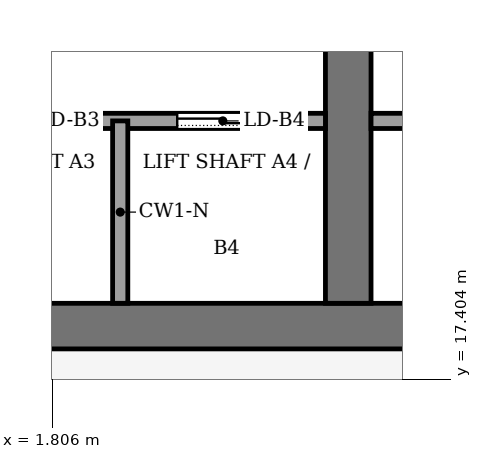
"""IFC4 building model, lengths in metres.
Left out: names, types, materials, properties, quantities, classifications, styles, units other than length and angle.
Written with IfcOpenShell. Run it as: python <this file> out.ifc"""

import sys

from ifc_helpers import new_model, si_unit, direction, frame, frame_2d, origin, place, context, subcontext, project, spatial, rectangle, extrude, element, fill, save


model = new_model("IFC4")
c1 = context("Model", 3, precision=1e-05, world=origin(), true_north=direction((0.0, 1.0)))
c2 = subcontext(c1, "Body", "Model", "MODEL_VIEW")
j1 = project(units=[si_unit("LENGTHUNIT", "METRE"), si_unit("PLANEANGLEUNIT", "RADIAN")], contexts=[c1])
p1 = place(None, origin())
s1 = spatial("IfcSite", under=j1, at=p1, CompositionType="ELEMENT")
p2 = place(p1, origin())
s2 = spatial("IfcBuilding", under=s1, at=p2, CompositionType="ELEMENT")
p3 = place(p2, frame((0.0, 0.0, 334.0)))
s3 = spatial("IfcBuildingStorey", under=s2, at=p3, CompositionType="ELEMENT", Elevation=334.0)
p4 = place(p3, frame((-13.2, 18.1, -0.18), z_axis=(0.0, 0.0, 1.0), x_axis=(1.0, 0.0, 0.0)))
e1 = element("IfcWall", 1, at=p4, inside=s3, PredefinedType="SHEAR", context=c2, shape_type="SweptSolid", body=[
    extrude(rectangle(XDim=26.4, YDim=0.6, at=frame_2d((13.2, 0.0))), origin(), (0.0, 0.0, 1.0), 6.53),
])
p5 = place(p3, frame((5.7, 18.4, -0.18), z_axis=(0.0, 0.0, 1.0), x_axis=(0.0, 1.0, 0.0)))
e2 = element("IfcWall", 2, at=p5, inside=s3, PredefinedType="SHEAR", context=c2, shape_type="SweptSolid", body=[
    extrude(rectangle(XDim=19.2, YDim=0.6, at=frame_2d((9.6, 0.0))), origin(), (0.0, 0.0, 1.0), 6.53),
])
p6 = place(p5, frame((8.35, 0.0, 0.18)))
e3 = element("IfcOpeningElement", 3, at=p6, cuts=e2, PredefinedType="OPENING", context=c2, shape_type="SweptSolid", body=[
    extrude(rectangle(XDim=0.9, YDim=2.1, at=frame_2d((0.45, 1.05))), frame((0.0, 0.31, 0.0), z_axis=(0.0, -1.0, 0.0), x_axis=(1.0, 0.0, 0.0)), (0.0, 0.0, 1.0), 0.62),
])
p7 = place(p5, frame((13.3, 0.0, 0.18)))
e4 = element("IfcOpeningElement", 4, at=p7, cuts=e2, PredefinedType="OPENING", context=c2, shape_type="SweptSolid", body=[
    extrude(rectangle(XDim=2.4, YDim=2.4, at=frame_2d((1.2, 1.2))), frame((0.0, 0.31, 0.0), z_axis=(0.0, -1.0, 0.0), x_axis=(1.0, 0.0, 0.0)), (0.0, 0.0, 1.0), 0.62),
])
p8 = place(p3, frame((-5.4, 20.8, 0.0), z_axis=(0.0, 0.0, 1.0), x_axis=(1.0, 0.0, 0.0)))
e5 = element("IfcWall", 5, at=p8, inside=s3, PredefinedType="PARTITIONING", context=c2, shape_type="SweptSolid", body=[
    extrude(rectangle(XDim=10.8, YDim=0.2, at=frame_2d((5.4, 0.0))), origin(), (0.0, 0.0, 1.0), 6.35),
])
p9 = place(p8, frame((0.75, 0.0, 0.0)))
e6 = element("IfcOpeningElement", 6, at=p9, cuts=e5, PredefinedType="OPENING", context=c2, shape_type="SweptSolid", body=[
    extrude(rectangle(XDim=1.2, YDim=2.2, at=frame_2d((0.6, 1.1))), frame((0.0, 0.11, 0.0), z_axis=(0.0, -1.0, 0.0), x_axis=(1.0, 0.0, 0.0)), (0.0, 0.0, 1.0), 0.22),
])
p10 = place(p8, frame((3.45, 0.0, 0.0)))
e7 = element("IfcOpeningElement", 7, at=p10, cuts=e5, PredefinedType="OPENING", context=c2, shape_type="SweptSolid", body=[
    extrude(rectangle(XDim=1.2, YDim=2.2, at=frame_2d((0.6, 1.1))), frame((0.0, 0.11, 0.0), z_axis=(0.0, -1.0, 0.0), x_axis=(1.0, 0.0, 0.0)), (0.0, 0.0, 1.0), 0.22),
])
p11 = place(p8, frame((6.15, 0.0, 0.0)))
e8 = element("IfcOpeningElement", 8, at=p11, cuts=e5, PredefinedType="OPENING", context=c2, shape_type="SweptSolid", body=[
    extrude(rectangle(XDim=1.2, YDim=2.2, at=frame_2d((0.6, 1.1))), frame((0.0, 0.11, 0.0), z_axis=(0.0, -1.0, 0.0), x_axis=(1.0, 0.0, 0.0)), (0.0, 0.0, 1.0), 0.22),
])
p12 = place(p8, frame((8.85, 0.0, 0.0)))
e9 = element("IfcOpeningElement", 9, at=p12, cuts=e5, PredefinedType="OPENING", context=c2, shape_type="SweptSolid", body=[
    extrude(rectangle(XDim=1.2, YDim=2.2, at=frame_2d((0.6, 1.1))), frame((0.0, 0.11, 0.0), z_axis=(0.0, -1.0, 0.0), x_axis=(1.0, 0.0, 0.0)), (0.0, 0.0, 1.0), 0.22),
])
p13 = place(p3, frame((6.0, 20.8, 0.0), z_axis=(0.0, 0.0, 1.0), x_axis=(1.0, 0.0, 0.0)))
e10 = element("IfcWall", 10, at=p13, inside=s3, PredefinedType="PARTITIONING", context=c2, shape_type="SweptSolid", body=[
    extrude(rectangle(XDim=6.6, YDim=0.2, at=frame_2d((3.3, 0.0))), origin(), (0.0, 0.0, 1.0), 6.35),
])
p14 = place(p13, frame((1.15, 0.0, 0.0)))
e11 = element("IfcOpeningElement", 11, at=p14, cuts=e10, PredefinedType="OPENING", context=c2, shape_type="SweptSolid", body=[
    extrude(rectangle(XDim=1.0, YDim=2.1, at=frame_2d((0.5, 1.05))), frame((0.0, 0.11, 0.0), z_axis=(0.0, -1.0, 0.0), x_axis=(1.0, 0.0, 0.0)), (0.0, 0.0, 1.0), 0.22),
])
p15 = place(p13, frame((4.45, 0.0, 0.0)))
e12 = element("IfcOpeningElement", 12, at=p15, cuts=e10, PredefinedType="OPENING", context=c2, shape_type="SweptSolid", body=[
    extrude(rectangle(XDim=1.0, YDim=2.1, at=frame_2d((0.5, 1.05))), frame((0.0, 0.11, 0.0), z_axis=(0.0, -1.0, 0.0), x_axis=(1.0, 0.0, 0.0)), (0.0, 0.0, 1.0), 0.22),
])
p16 = place(p3, frame((2.7, 18.4, 0.0), z_axis=(0.0, 0.0, 1.0), x_axis=(0.0, 1.0, 0.0)))
e13 = element("IfcWall", 13, at=p16, inside=s3, PredefinedType="PARTITIONING", context=c2, shape_type="SweptSolid", body=[
    extrude(rectangle(XDim=2.4, YDim=0.2, at=frame_2d((1.2, 0.0))), origin(), (0.0, 0.0, 1.0), 6.35),
])
p17 = place(p11, origin())
e14 = element("IfcDoor", 14, at=p17, inside=s3, OperationType="SLIDING_TO_LEFT", PredefinedType="DOOR", context=c2, shape_type="SweptSolid", body=[
    extrude(rectangle(XDim=1.2, YDim=2.2, at=frame_2d((0.6, 1.1))), frame((0.0, 0.025, 0.0), z_axis=(0.0, -1.0, 0.0), x_axis=(1.0, 0.0, 0.0)), (0.0, 0.0, 1.0), 0.05),
])
fill(e8, e14)
p18 = place(p12, origin())
e15 = element("IfcDoor", 15, at=p18, inside=s3, OperationType="SLIDING_TO_LEFT", PredefinedType="DOOR", context=c2, shape_type="SweptSolid", body=[
    extrude(rectangle(XDim=1.2, YDim=2.2, at=frame_2d((0.6, 1.1))), frame((0.0, 0.025, 0.0), z_axis=(0.0, -1.0, 0.0), x_axis=(1.0, 0.0, 0.0)), (0.0, 0.0, 1.0), 0.05),
])
fill(e9, e15)
save(model, sys.argv[1])
